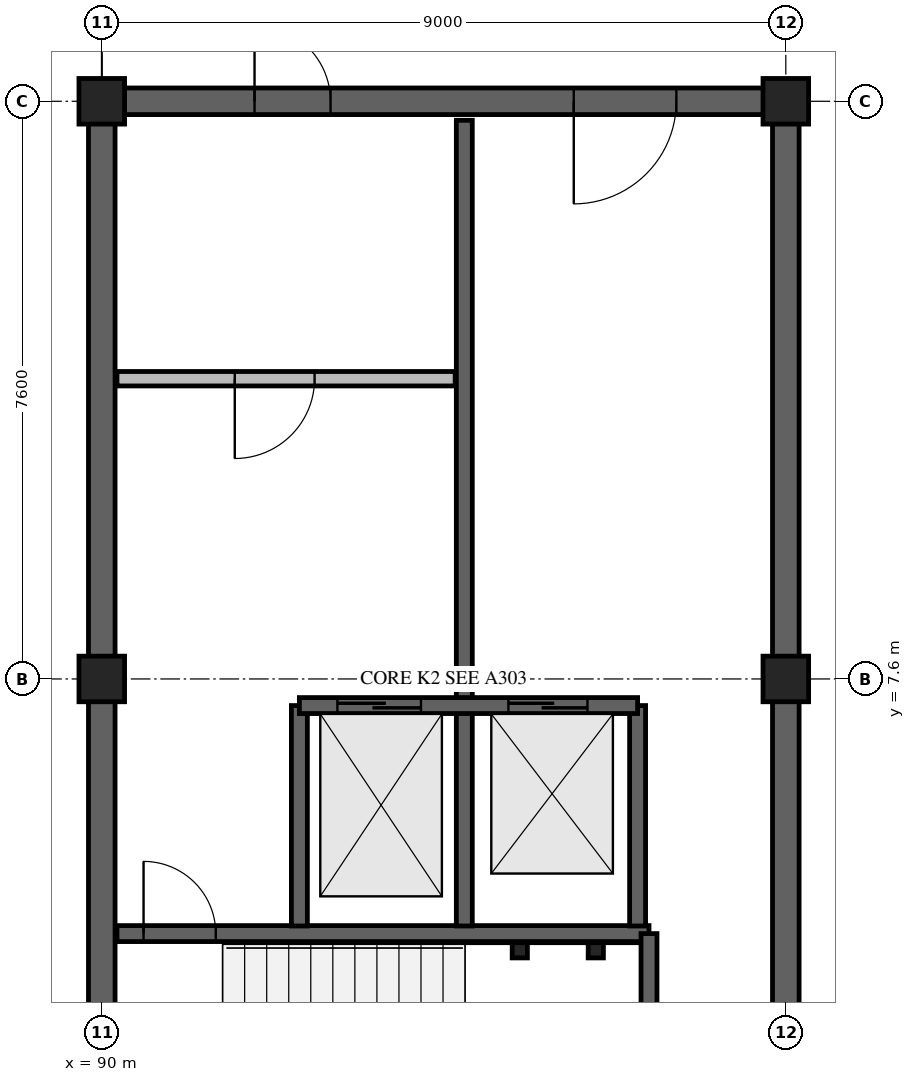
"""IFC4 building model, lengths in metres.
Left out: names, types, materials, properties, quantities, classifications, styles, units other than length and angle.
Written with IfcOpenShell. Run it as: python <this file> out.ifc"""

import sys

from ifc_helpers import new_model, si_unit, direction, frame, frame_2d, origin, origin_2d, place, context, subcontext, project, spatial, rectangle, hollow_rectangle, extrude, element, fill, save


model = new_model("IFC4")
c1 = context("Model", 3, precision=1e-05, world=origin(), true_north=direction((0.0, 1.0)))
c2 = subcontext(c1, "Body", "Model", "MODEL_VIEW")
j1 = project(units=[si_unit("LENGTHUNIT", "METRE"), si_unit("PLANEANGLEUNIT", "RADIAN")], contexts=[c1])
p1 = place(None, origin())
s1 = spatial("IfcSite", under=j1, at=p1, CompositionType="ELEMENT")
p2 = place(p1, origin())
s2 = spatial("IfcBuilding", under=s1, at=p2, CompositionType="ELEMENT")
p3 = place(p2, frame((0.0, 0.0, -4.32)))
s3 = spatial("IfcBuildingStorey", under=s2, at=p3, CompositionType="ELEMENT", Elevation=-4.32)
for number, where, z_axis, x_axis in (
    (1, (90.0, 7.6, 0.0), (0.0, 0.0, 1.0), (1.0, 0.0, 0.0)),
    (2, (90.0, 15.2, 0.0), (0.0, 0.0, 1.0), (1.0, 0.0, 0.0)),
    (3, (99.0, 7.6, 0.0), (0.0, 0.0, 1.0), (1.0, 0.0, 0.0)),
    (4, (99.0, 15.2, 0.0), (0.0, 0.0, 1.0), (1.0, 0.0, 0.0)),
):
    element("IfcColumn", number, at=place(p3, frame(where, z_axis=z_axis, x_axis=x_axis)), inside=s3, PredefinedType="COLUMN", context=c2, shape_type="SweptSolid", body=[
        extrude(rectangle(XDim=0.6, YDim=0.6, at=origin_2d()), origin(), (0.0, 0.0, 1.0), 4.32),
    ])
p4 = place(p3, frame((90.16, 15.2, 0.0), z_axis=(0.0, 0.0, 1.0), x_axis=(1.0, 0.0, 0.0)))
e5 = element("IfcWall", 5, at=p4, inside=s3, PredefinedType="SHEAR", context=c2, shape_type="SweptSolid", body=[
    extrude(rectangle(XDim=8.68, YDim=0.35, at=frame_2d((4.34, 0.0))), origin(), (0.0, 0.0, 1.0), 4.04),
])
p5 = place(p4, frame((1.85, 0.0, 0.0)))
e6 = element("IfcOpeningElement", 6, at=p5, cuts=e5, PredefinedType="OPENING", context=c2, shape_type="SweptSolid", body=[
    extrude(rectangle(XDim=1.0, YDim=2.15, at=frame_2d((0.5, 1.075))), frame((0.0, 0.185, 0.0), z_axis=(0.0, -1.0, 0.0), x_axis=(1.0, 0.0, 0.0)), (0.0, 0.0, 1.0), 0.37),
])
p6 = place(p4, frame((6.05, 0.0, 0.0)))
e7 = element("IfcOpeningElement", 7, at=p6, cuts=e5, PredefinedType="OPENING", context=c2, shape_type="SweptSolid", body=[
    extrude(rectangle(XDim=1.35, YDim=2.18, at=frame_2d((0.675, 1.09))), frame((0.0, 0.185, 0.0), z_axis=(0.0, -1.0, 0.0), x_axis=(1.0, 0.0, 0.0)), (0.0, 0.0, 1.0), 0.37),
])
for number, where, z_axis, x_axis in (
    (8, (90.0, 0.16, 0.0), (0.0, 0.0, 1.0), (0.0, 1.0, 0.0)),
    (9, (99.0, 0.16, 0.0), (0.0, 0.0, 1.0), (0.0, 1.0, 0.0)),
):
    element("IfcWall", number, at=place(p3, frame(where, z_axis=z_axis, x_axis=x_axis)), inside=s3, PredefinedType="SHEAR", context=c2, shape_type="SweptSolid", body=[
        extrude(rectangle(XDim=14.88, YDim=0.35, at=frame_2d((7.44, 0.0))), origin(), (0.0, 0.0, 1.0), 4.04),
    ])
p7 = place(p3, frame((90.2, 4.25, 0.0), z_axis=(0.0, 0.0, 1.0), x_axis=(1.0, 0.0, 0.0)))
e10 = element("IfcWall", 10, at=p7, inside=s3, PredefinedType="SOLIDWALL", context=c2, shape_type="SweptSolid", body=[
    extrude(rectangle(XDim=7.0, YDim=0.21, at=frame_2d((3.5, 0.0))), origin(), (0.0, 0.0, 1.0), 4.04),
])
p8 = place(p7, frame((0.35, 0.0, 0.0)))
e11 = element("IfcOpeningElement", 11, at=p8, cuts=e10, PredefinedType="OPENING", context=c2, shape_type="SweptSolid", body=[
    extrude(rectangle(XDim=0.95, YDim=2.12, at=frame_2d((0.475, 1.06))), frame((0.0, 0.115, 0.0), z_axis=(0.0, -1.0, 0.0), x_axis=(1.0, 0.0, 0.0)), (0.0, 0.0, 1.0), 0.23),
])
p9 = place(p3, frame((97.2, 0.2, 0.0), z_axis=(0.0, 0.0, 1.0), x_axis=(0.0, 1.0, 0.0)))
e12 = element("IfcWall", 12, at=p9, inside=s3, PredefinedType="SOLIDWALL", context=c2, shape_type="SweptSolid", body=[
    extrude(rectangle(XDim=4.05, YDim=0.21, at=frame_2d((2.025, 0.0))), origin(), (0.0, 0.0, 1.0), 4.04),
])
p10 = place(p3, frame((92.6, 4.35, 0.0), z_axis=(0.0, 0.0, 1.0), x_axis=(0.0, 1.0, 0.0)))
e13 = element("IfcWall", 13, at=p10, inside=s3, PredefinedType="SOLIDWALL", context=c2, shape_type="SweptSolid", body=[
    extrude(rectangle(XDim=2.9, YDim=0.21, at=frame_2d((1.45, 0.0))), origin(), (0.0, 0.0, 1.0), 4.04),
])
p11 = place(p3, frame((94.77, 4.35, 0.0), z_axis=(0.0, 0.0, 1.0), x_axis=(0.0, 1.0, 0.0)))
e14 = element("IfcWall", 14, at=p11, inside=s3, PredefinedType="SOLIDWALL", context=c2, shape_type="SweptSolid", body=[
    extrude(rectangle(XDim=10.6, YDim=0.21, at=frame_2d((5.3, 0.0))), origin(), (0.0, 0.0, 1.0), 4.04),
])
p12 = place(p3, frame((97.05, 4.35, 0.0), z_axis=(0.0, 0.0, 1.0), x_axis=(0.0, 1.0, 0.0)))
e15 = element("IfcWall", 15, at=p12, inside=s3, PredefinedType="SOLIDWALL", context=c2, shape_type="SweptSolid", body=[
    extrude(rectangle(XDim=2.9, YDim=0.21, at=frame_2d((1.45, 0.0))), origin(), (0.0, 0.0, 1.0), 4.04),
])
p13 = place(p3, frame((92.6, 7.25, 0.0), z_axis=(0.0, 0.0, 1.0), x_axis=(1.0, 0.0, 0.0)))
e16 = element("IfcWall", 16, at=p13, inside=s3, PredefinedType="SOLIDWALL", context=c2, shape_type="SweptSolid", body=[
    extrude(rectangle(XDim=4.45, YDim=0.21, at=frame_2d((2.225, 0.0))), origin(), (0.0, 0.0, 1.0), 4.04),
])
p14 = place(p13, frame((0.5, 0.0, 0.0)))
e17 = element("IfcOpeningElement", 17, at=p14, cuts=e16, PredefinedType="OPENING", context=c2, shape_type="SweptSolid", body=[
    extrude(rectangle(XDim=1.1, YDim=2.14, at=frame_2d((0.55, 1.07))), frame((0.0, 0.115, 0.0), z_axis=(0.0, -1.0, 0.0), x_axis=(1.0, 0.0, 0.0)), (0.0, 0.0, 1.0), 0.23),
])
p15 = place(p13, frame((2.75, 0.0, 0.0)))
e18 = element("IfcOpeningElement", 18, at=p15, cuts=e16, PredefinedType="OPENING", context=c2, shape_type="SweptSolid", body=[
    extrude(rectangle(XDim=1.04, YDim=2.1, at=frame_2d((0.52, 1.05))), frame((0.0, 0.115, 0.0), z_axis=(0.0, -1.0, 0.0), x_axis=(1.0, 0.0, 0.0)), (0.0, 0.0, 1.0), 0.23),
])
p16 = place(p3, frame((90.2, 11.55, 0.0), z_axis=(0.0, 0.0, 1.0), x_axis=(1.0, 0.0, 0.0)))
e19 = element("IfcWall", 19, at=p16, inside=s3, PredefinedType="SOLIDWALL", context=c2, shape_type="SweptSolid", body=[
    extrude(rectangle(XDim=4.45, YDim=0.19, at=frame_2d((2.225, 0.0))), origin(), (0.0, 0.0, 1.0), 4.04),
])
p17 = place(p16, frame((1.55, 0.0, 0.0)))
e20 = element("IfcOpeningElement", 20, at=p17, cuts=e19, PredefinedType="OPENING", context=c2, shape_type="SweptSolid", body=[
    extrude(rectangle(XDim=1.05, YDim=2.12, at=frame_2d((0.525, 1.06))), frame((0.0, 0.105, 0.0), z_axis=(0.0, -1.0, 0.0), x_axis=(1.0, 0.0, 0.0)), (0.0, 0.0, 1.0), 0.21),
])
for number, where, z_axis, x_axis in (
    (21, (95.5, 4.03, 0.0), (0.0, 0.0, 1.0), (1.0, 0.0, 0.0)),
    (22, (96.5, 4.03, 0.0), (0.0, 0.0, 1.0), (1.0, 0.0, 0.0)),
):
    element("IfcColumn", number, at=place(p3, frame(where, z_axis=z_axis, x_axis=x_axis)), inside=s3, PredefinedType="COLUMN", context=c2, shape_type="SweptSolid", body=[
        extrude(hollow_rectangle(XDim=0.2, YDim=0.2, WallThickness=0.012, at=origin_2d()), origin(), (0.0, 0.0, 1.0), 4.32),
    ])
p18 = place(p8, origin())
e23 = element("IfcDoor", 23, at=p18, inside=s3, OperationType="SINGLE_SWING_LEFT", PredefinedType="DOOR", context=c2, shape_type="SweptSolid", body=[
    extrude(rectangle(XDim=0.95, YDim=2.12, at=frame_2d((0.475, 1.06))), frame((0.0, 0.025, 0.0), z_axis=(0.0, -1.0, 0.0), x_axis=(1.0, 0.0, 0.0)), (0.0, 0.0, 1.0), 0.05),
])
fill(e11, e23)
p19 = place(p14, origin())
e24 = element("IfcDoor", 24, at=p19, inside=s3, OperationType="SLIDING_TO_LEFT", PredefinedType="DOOR", context=c2, shape_type="SweptSolid", body=[
    extrude(rectangle(XDim=1.1, YDim=2.14, at=frame_2d((0.55, 1.07))), frame((0.0, 0.025, 0.0), z_axis=(0.0, -1.0, 0.0), x_axis=(1.0, 0.0, 0.0)), (0.0, 0.0, 1.0), 0.05),
])
fill(e17, e24)
p20 = place(p15, origin())
e25 = element("IfcDoor", 25, at=p20, inside=s3, OperationType="SLIDING_TO_LEFT", PredefinedType="DOOR", context=c2, shape_type="SweptSolid", body=[
    extrude(rectangle(XDim=1.04, YDim=2.1, at=frame_2d((0.52, 1.05))), frame((0.0, 0.025, 0.0), z_axis=(0.0, -1.0, 0.0), x_axis=(1.0, 0.0, 0.0)), (0.0, 0.0, 1.0), 0.05),
])
fill(e18, e25)
p21 = place(p17, origin())
e26 = element("IfcDoor", 26, at=p21, inside=s3, OperationType="SINGLE_SWING_RIGHT", PredefinedType="DOOR", context=c2, shape_type="SweptSolid", body=[
    extrude(rectangle(XDim=1.05, YDim=2.12, at=frame_2d((0.525, 1.06))), frame((0.0, 0.025, 0.0), z_axis=(0.0, -1.0, 0.0), x_axis=(1.0, 0.0, 0.0)), (0.0, 0.0, 1.0), 0.05),
])
fill(e20, e26)
p22 = place(p5, origin())
e27 = element("IfcDoor", 27, at=p22, inside=s3, OperationType="SINGLE_SWING_LEFT", PredefinedType="DOOR", context=c2, shape_type="SweptSolid", body=[
    extrude(rectangle(XDim=1.0, YDim=2.15, at=frame_2d((0.5, 1.075))), frame((0.0, 0.025, 0.0), z_axis=(0.0, -1.0, 0.0), x_axis=(1.0, 0.0, 0.0)), (0.0, 0.0, 1.0), 0.05),
])
fill(e6, e27)
p23 = place(p6, origin())
e28 = element("IfcDoor", 28, at=p23, inside=s3, OperationType="SINGLE_SWING_RIGHT", PredefinedType="DOOR", context=c2, shape_type="SweptSolid", body=[
    extrude(rectangle(XDim=1.35, YDim=2.18, at=frame_2d((0.675, 1.09))), frame((0.0, 0.025, 0.0), z_axis=(0.0, -1.0, 0.0), x_axis=(1.0, 0.0, 0.0)), (0.0, 0.0, 1.0), 0.05),
])
fill(e7, e28)
save(model, sys.argv[1])
